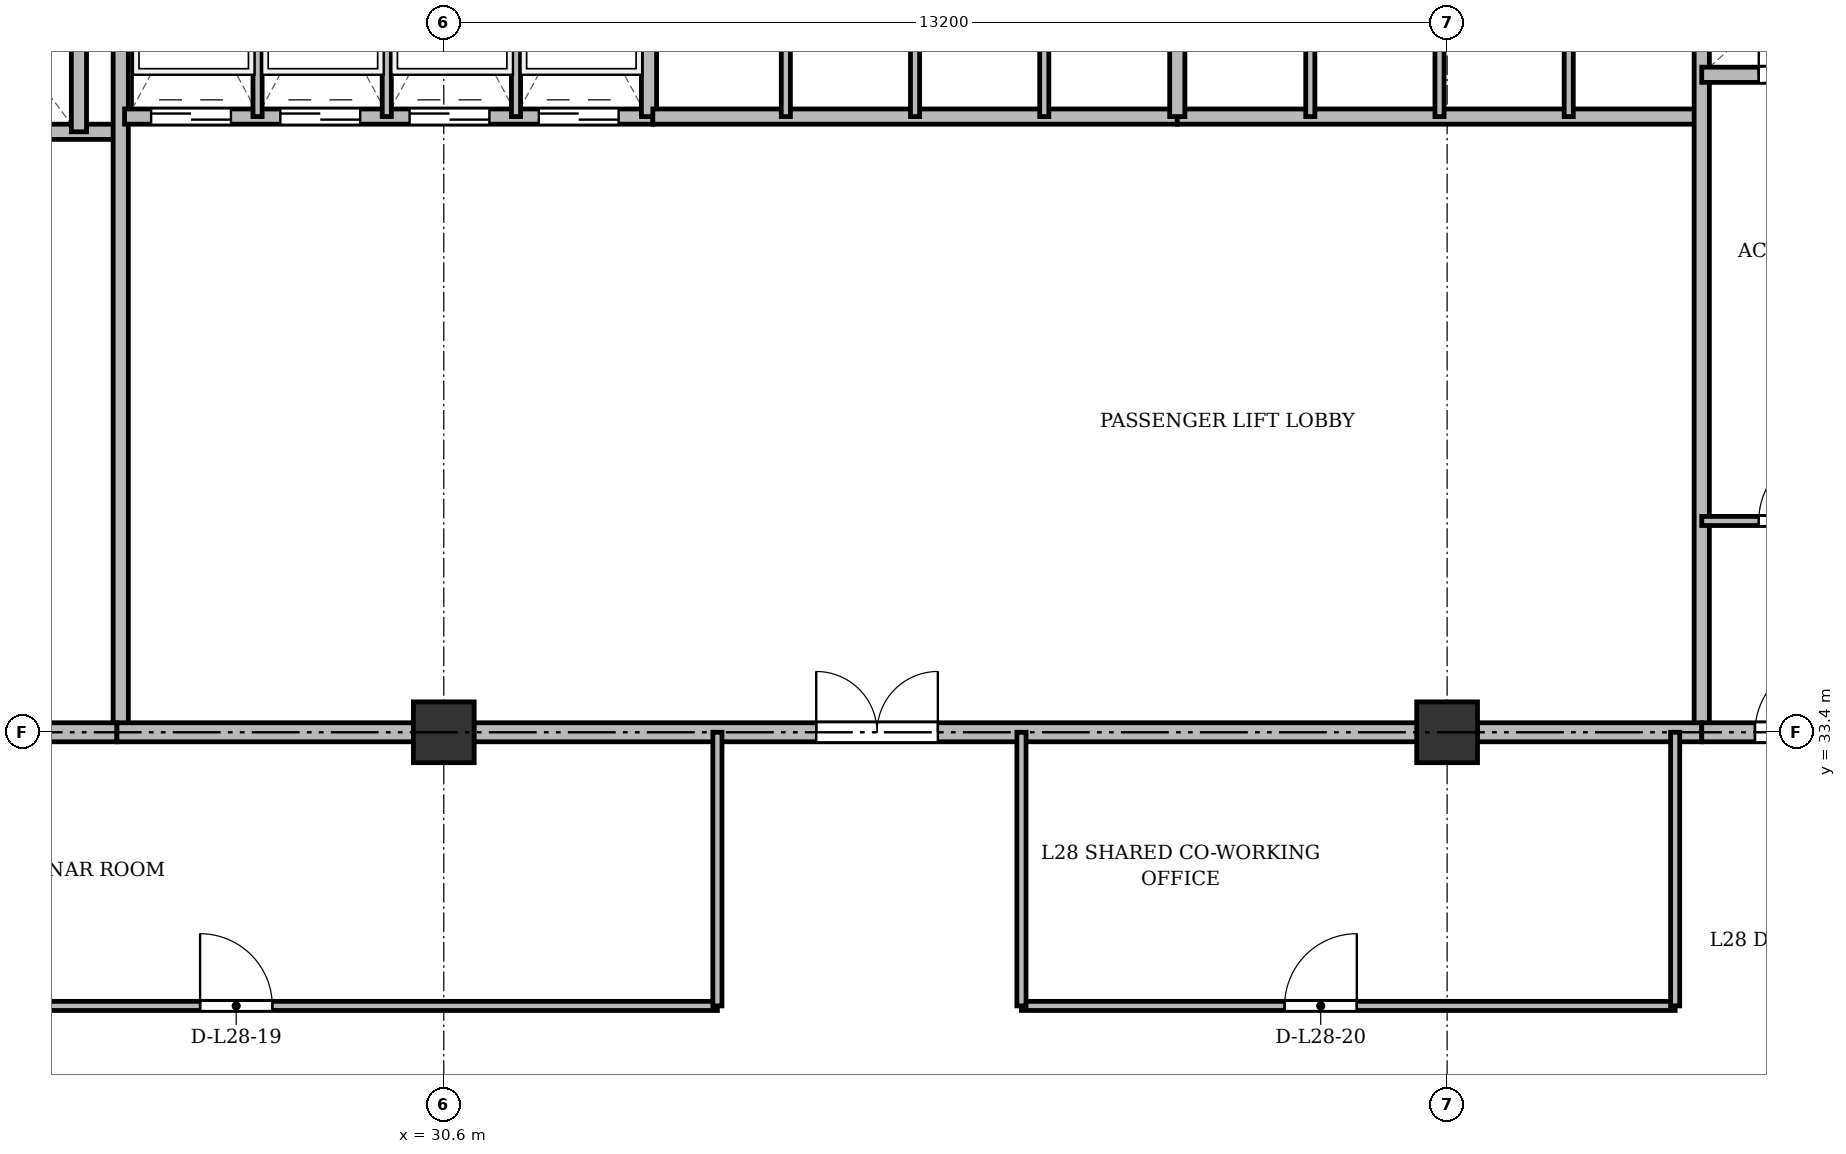
"""IFC4 building model, lengths in metres.
Left out: names, types, materials, properties, quantities, classifications, styles, units other than length and angle.
Written with IfcOpenShell. Run it as: python <this file> out.ifc"""

import sys

from ifc_helpers import new_model, si_unit, direction, frame, frame_2d, origin, origin_2d, place, context, subcontext, project, spatial, rectangle, extrude, source, transform, mapped, element, fill, save


model = new_model("IFC4")
c1 = context("Model", 3, precision=1e-05, world=origin(), true_north=direction((0.0, 1.0)))
c2 = subcontext(c1, "Body", "Model", "MODEL_VIEW")
j1 = project(units=[si_unit("LENGTHUNIT", "METRE"), si_unit("PLANEANGLEUNIT", "RADIAN")], contexts=[c1])
p1 = place(None, origin())
s1 = spatial("IfcSite", under=j1, at=p1, CompositionType="ELEMENT")
p2 = place(p1, origin())
s2 = spatial("IfcBuilding", under=s1, at=p2, CompositionType="ELEMENT")
p3 = place(p2, frame((0.0, 0.0, 110.5)))
s3 = spatial("IfcBuildingStorey", under=s2, at=p3, CompositionType="ELEMENT", Elevation=110.5)
m1 = source(origin(), c2, "Body", "SweptSolid", [
    extrude(rectangle(XDim=0.8, YDim=0.8, at=origin_2d()), origin(), (0.0, 0.0, 1.0), 3.6),
])
for number, where, z_axis, x_axis in (
    (1, (30.6, 33.4, 0.0), (0.0, 0.0, 1.0), (1.0, 0.0, 0.0)),
    (2, (43.8, 33.4, 0.0), (0.0, 0.0, 1.0), (1.0, 0.0, 0.0)),
):
    element("IfcColumn", number, at=place(p3, frame(where, z_axis=z_axis, x_axis=x_axis)), inside=s3, PredefinedType="COLUMN", context=c2, shape_type="MappedRepresentation", body=[
        mapped(m1, transform((0.0, 0.0, 0.0), x_axis=(1.0, 0.0, 0.0), y_axis=(0.0, 1.0, 0.0), z_axis=(0.0, 0.0, 1.0), scale=1.0)),
    ])
p4 = place(p3, frame((19.55, 41.3, 0.0), z_axis=(0.0, 0.0, 1.0), x_axis=(1.0, 0.0, 0.0)))
e3 = element("IfcWall", 3, at=p4, inside=s3, PredefinedType="SOLIDWALL", context=c2, shape_type="SweptSolid", body=[
    extrude(rectangle(XDim=6.75, YDim=0.2, at=frame_2d((3.375, 0.0))), origin(), (0.0, 0.0, 1.0), 3.34),
])
p5 = place(p4, frame((1.7, 0.0, 0.0)))
e4 = element("IfcOpeningElement", 4, at=p5, cuts=e3, PredefinedType="OPENING", context=c2, shape_type="SweptSolid", body=[
    extrude(rectangle(XDim=1.1, YDim=2.15, at=frame_2d((0.55, 1.075))), frame((0.0, 0.11, 0.0), z_axis=(0.0, -1.0, 0.0), x_axis=(1.0, 0.0, 0.0)), (0.0, 0.0, 1.0), 0.22),
])
p6 = place(p4, frame((4.4, 0.0, 0.0)))
e5 = element("IfcOpeningElement", 5, at=p6, cuts=e3, PredefinedType="OPENING", context=c2, shape_type="SweptSolid", body=[
    extrude(rectangle(XDim=1.1, YDim=2.15, at=frame_2d((0.55, 1.075))), frame((0.0, 0.11, 0.0), z_axis=(0.0, -1.0, 0.0), x_axis=(1.0, 0.0, 0.0)), (0.0, 0.0, 1.0), 0.22),
])
p7 = place(p3, frame((25.8, 41.3, 0.0), z_axis=(0.0, 0.0, 1.0), x_axis=(0.0, 1.0, 0.0)))
e6 = element("IfcWall", 6, at=p7, inside=s3, PredefinedType="SOLIDWALL", context=c2, shape_type="SweptSolid", body=[
    extrude(rectangle(XDim=3.4, YDim=0.2, at=frame_2d((1.7, 0.0))), origin(), (0.0, 0.0, 1.0), 3.34),
])
p8 = place(p3, frame((26.35, 33.4, 0.0), z_axis=(0.0, 0.0, 1.0), x_axis=(0.0, 1.0, 0.0)))
e7 = element("IfcWall", 7, at=p8, inside=s3, PredefinedType="SOLIDWALL", context=c2, shape_type="SweptSolid", body=[
    extrude(rectangle(XDim=11.3, YDim=0.2, at=frame_2d((5.65, 0.0))), origin(), (0.0, 0.0, 1.0), 2.752),
])
p9 = place(p3, frame((19.5, 33.4, 0.0), z_axis=(0.0, 0.0, 1.0), x_axis=(1.0, 0.0, 0.0)))
e8 = element("IfcWall", 8, at=p9, inside=s3, PredefinedType="PARTITIONING", context=c2, shape_type="SweptSolid", body=[
    extrude(rectangle(XDim=6.8, YDim=0.25, at=frame_2d((3.4, 0.0))), origin(), (0.0, 0.0, 1.0), 2.752),
])
p10 = place(p9, frame((0.75, 0.0, 0.0)))
e9 = element("IfcOpeningElement", 9, at=p10, cuts=e8, PredefinedType="OPENING", context=c2, shape_type="SweptSolid", body=[
    extrude(rectangle(XDim=1.6, YDim=2.2, at=frame_2d((0.8, 1.1))), frame((0.0, 0.135, 0.0), z_axis=(0.0, -1.0, 0.0), x_axis=(1.0, 0.0, 0.0)), (0.0, 0.0, 1.0), 0.27),
])
p11 = place(p3, frame((26.4, 41.5, 0.0), z_axis=(0.0, 0.0, 1.0), x_axis=(1.0, 0.0, 0.0)))
e10 = element("IfcWall", 10, at=p11, inside=s3, PredefinedType="SOLIDWALL", context=c2, shape_type="SweptSolid", body=[
    extrude(rectangle(XDim=6.95, YDim=0.2, at=frame_2d((3.475, 0.0))), origin(), (0.0, 0.0, 1.0), 3.34),
])
p12 = place(p11, frame((0.35, 0.0, 0.0)))
e11 = element("IfcOpeningElement", 11, at=p12, cuts=e10, PredefinedType="OPENING", context=c2, shape_type="SweptSolid", body=[
    extrude(rectangle(XDim=1.05, YDim=2.15, at=frame_2d((0.525, 1.075))), frame((0.0, 0.11, 0.0), z_axis=(0.0, -1.0, 0.0), x_axis=(1.0, 0.0, 0.0)), (0.0, 0.0, 1.0), 0.22),
])
p13 = place(p11, frame((2.05, 0.0, 0.0)))
e12 = element("IfcOpeningElement", 12, at=p13, cuts=e10, PredefinedType="OPENING", context=c2, shape_type="SweptSolid", body=[
    extrude(rectangle(XDim=1.05, YDim=2.15, at=frame_2d((0.525, 1.075))), frame((0.0, 0.11, 0.0), z_axis=(0.0, -1.0, 0.0), x_axis=(1.0, 0.0, 0.0)), (0.0, 0.0, 1.0), 0.22),
])
p14 = place(p11, frame((3.75, 0.0, 0.0)))
e13 = element("IfcOpeningElement", 13, at=p14, cuts=e10, PredefinedType="OPENING", context=c2, shape_type="SweptSolid", body=[
    extrude(rectangle(XDim=1.05, YDim=2.15, at=frame_2d((0.525, 1.075))), frame((0.0, 0.11, 0.0), z_axis=(0.0, -1.0, 0.0), x_axis=(1.0, 0.0, 0.0)), (0.0, 0.0, 1.0), 0.22),
])
p15 = place(p11, frame((5.45, 0.0, 0.0)))
e14 = element("IfcOpeningElement", 14, at=p15, cuts=e10, PredefinedType="OPENING", context=c2, shape_type="SweptSolid", body=[
    extrude(rectangle(XDim=1.05, YDim=2.15, at=frame_2d((0.525, 1.075))), frame((0.0, 0.11, 0.0), z_axis=(0.0, -1.0, 0.0), x_axis=(1.0, 0.0, 0.0)), (0.0, 0.0, 1.0), 0.22),
])
p16 = place(p3, frame((33.3, 41.5, 0.0), z_axis=(0.0, 0.0, 1.0), x_axis=(0.0, 1.0, 0.0)))
e15 = element("IfcWall", 15, at=p16, inside=s3, PredefinedType="SOLIDWALL", context=c2, shape_type="SweptSolid", body=[
    extrude(rectangle(XDim=3.2, YDim=0.2, at=frame_2d((1.6, 0.0))), origin(), (0.0, 0.0, 1.0), 3.34),
])
for number, where, z_axis, x_axis in (
    (16, (28.15, 41.5, 0.0), (0.0, 0.0, 1.0), (0.0, 1.0, 0.0)),
    (17, (29.85, 41.5, 0.0), (0.0, 0.0, 1.0), (0.0, 1.0, 0.0)),
    (18, (31.55, 41.5, 0.0), (0.0, 0.0, 1.0), (0.0, 1.0, 0.0)),
):
    element("IfcWall", number, at=place(p3, frame(where, z_axis=z_axis, x_axis=x_axis)), inside=s3, PredefinedType="PARTITIONING", context=c2, shape_type="SweptSolid", body=[
        extrude(rectangle(XDim=3.2, YDim=0.12, at=frame_2d((1.6, 0.0))), origin(), (0.0, 0.0, 1.0), 3.34),
    ])
p17 = place(p3, frame((33.35, 41.5, 0.0), z_axis=(0.0, 0.0, 1.0), x_axis=(1.0, 0.0, 0.0)))
e19 = element("IfcWall", 19, at=p17, inside=s3, PredefinedType="SOLIDWALL", context=c2, shape_type="SweptSolid", body=[
    extrude(rectangle(XDim=6.9, YDim=0.2, at=frame_2d((3.45, 0.0))), origin(), (0.0, 0.0, 1.0), 3.34),
])
for number, where, z_axis, x_axis in (
    (20, (35.1, 41.5, 0.0), (0.0, 0.0, 1.0), (0.0, 1.0, 0.0)),
    (21, (36.8, 41.5, 0.0), (0.0, 0.0, 1.0), (0.0, 1.0, 0.0)),
    (22, (38.5, 41.5, 0.0), (0.0, 0.0, 1.0), (0.0, 1.0, 0.0)),
):
    element("IfcWall", number, at=place(p3, frame(where, z_axis=z_axis, x_axis=x_axis)), inside=s3, PredefinedType="PARTITIONING", context=c2, shape_type="SweptSolid", body=[
        extrude(rectangle(XDim=3.2, YDim=0.12, at=frame_2d((1.6, 0.0))), origin(), (0.0, 0.0, 1.0), 3.34),
    ])
p18 = place(p3, frame((40.25, 41.5, 0.0), z_axis=(0.0, 0.0, 1.0), x_axis=(1.0, 0.0, 0.0)))
e23 = element("IfcWall", 23, at=p18, inside=s3, PredefinedType="SOLIDWALL", context=c2, shape_type="SweptSolid", body=[
    extrude(rectangle(XDim=6.9, YDim=0.2, at=frame_2d((3.45, 0.0))), origin(), (0.0, 0.0, 1.0), 2.84),
])
p19 = place(p3, frame((40.25, 41.5, 0.0), z_axis=(0.0, 0.0, 1.0), x_axis=(0.0, 1.0, 0.0)))
e24 = element("IfcWall", 24, at=p19, inside=s3, PredefinedType="SOLIDWALL", context=c2, shape_type="SweptSolid", body=[
    extrude(rectangle(XDim=3.2, YDim=0.2, at=frame_2d((1.6, 0.0))), origin(), (0.0, 0.0, 1.0), 3.34),
])
p20 = place(p3, frame((42.0, 41.5, 0.0), z_axis=(0.0, 0.0, 1.0), x_axis=(0.0, 1.0, 0.0)))
e25 = element("IfcWall", 25, at=p20, inside=s3, PredefinedType="PARTITIONING", context=c2, shape_type="SweptSolid", body=[
    extrude(rectangle(XDim=3.2, YDim=0.12, at=frame_2d((1.6, 0.0))), origin(), (0.0, 0.0, 1.0), 3.34),
])
p21 = place(p3, frame((43.7, 41.5, 0.0), z_axis=(0.0, 0.0, 1.0), x_axis=(0.0, 1.0, 0.0)))
e26 = element("IfcWall", 26, at=p21, inside=s3, PredefinedType="PARTITIONING", context=c2, shape_type="SweptSolid", body=[
    extrude(rectangle(XDim=3.2, YDim=0.12, at=frame_2d((1.6, 0.0))), origin(), (0.0, 0.0, 1.0), 2.84),
])
p22 = place(p3, frame((45.4, 41.5, 0.0), z_axis=(0.0, 0.0, 1.0), x_axis=(0.0, 1.0, 0.0)))
e27 = element("IfcWall", 27, at=p22, inside=s3, PredefinedType="PARTITIONING", context=c2, shape_type="SweptSolid", body=[
    extrude(rectangle(XDim=3.2, YDim=0.12, at=frame_2d((1.6, 0.0))), origin(), (0.0, 0.0, 1.0), 3.34),
])
p23 = place(p3, frame((47.15, 33.4, 0.0), z_axis=(0.0, 0.0, 1.0), x_axis=(0.0, 1.0, 0.0)))
e28 = element("IfcWall", 28, at=p23, inside=s3, PredefinedType="SOLIDWALL", context=c2, shape_type="SweptSolid", body=[
    extrude(rectangle(XDim=11.3, YDim=0.2, at=frame_2d((5.65, 0.0))), origin(), (0.0, 0.0, 1.0), 2.752),
])
p24 = place(p3, frame((26.3, 33.4, 0.0), z_axis=(0.0, 0.0, 1.0), x_axis=(1.0, 0.0, 0.0)))
e29 = element("IfcWall", 29, at=p24, inside=s3, PredefinedType="PARTITIONING", context=c2, shape_type="SweptSolid", body=[
    extrude(rectangle(XDim=20.85, YDim=0.25, at=frame_2d((10.425, 0.0))), origin(), (0.0, 0.0, 1.0), 2.752),
])
p25 = place(p24, frame((9.2, 0.0, 0.0)))
e30 = element("IfcOpeningElement", 30, at=p25, cuts=e29, PredefinedType="OPENING", context=c2, shape_type="SweptSolid", body=[
    extrude(rectangle(XDim=1.6, YDim=2.2, at=frame_2d((0.8, 1.1))), frame((0.0, 0.135, 0.0), z_axis=(0.0, -1.0, 0.0), x_axis=(1.0, 0.0, 0.0)), (0.0, 0.0, 1.0), 0.27),
])
p26 = place(p3, frame((47.15, 42.05, 0.0), z_axis=(0.0, 0.0, 1.0), x_axis=(1.0, 0.0, 0.0)))
e31 = element("IfcWall", 31, at=p26, inside=s3, PredefinedType="SOLIDWALL", context=c2, shape_type="SweptSolid", body=[
    extrude(rectangle(XDim=7.85, YDim=0.2, at=frame_2d((3.925, 0.0))), origin(), (0.0, 0.0, 1.0), 2.84),
])
p27 = place(p26, frame((0.75, 0.0, 0.0)))
e32 = element("IfcOpeningElement", 32, at=p27, cuts=e31, PredefinedType="OPENING", context=c2, shape_type="SweptSolid", body=[
    extrude(rectangle(XDim=0.9, YDim=2.1, at=frame_2d((0.45, 1.05))), frame((0.0, 0.11, 0.0), z_axis=(0.0, -1.0, 0.0), x_axis=(1.0, 0.0, 0.0)), (0.0, 0.0, 1.0), 0.22),
])
p28 = place(p26, frame((3.85, 0.0, 0.0)))
e33 = element("IfcOpeningElement", 33, at=p28, cuts=e31, PredefinedType="OPENING", context=c2, shape_type="SweptSolid", body=[
    extrude(rectangle(XDim=0.9, YDim=2.1, at=frame_2d((0.45, 1.05))), frame((0.0, 0.11, 0.0), z_axis=(0.0, -1.0, 0.0), x_axis=(1.0, 0.0, 0.0)), (0.0, 0.0, 1.0), 0.22),
])
p29 = place(p3, frame((47.15, 36.18, 0.0), z_axis=(0.0, 0.0, 1.0), x_axis=(1.0, 0.0, 0.0)))
e34 = element("IfcWall", 34, at=p29, inside=s3, PredefinedType="PARTITIONING", context=c2, shape_type="SweptSolid", body=[
    extrude(rectangle(XDim=5.3, YDim=0.12, at=frame_2d((2.65, 0.0))), origin(), (0.0, 0.0, 1.0), 2.84),
])
p30 = place(p29, frame((0.75, 0.0, 0.0)))
e35 = element("IfcOpeningElement", 35, at=p30, cuts=e34, PredefinedType="OPENING", context=c2, shape_type="SweptSolid", body=[
    extrude(rectangle(XDim=0.95, YDim=2.15, at=frame_2d((0.475, 1.075))), frame((0.0, 0.07, 0.0), z_axis=(0.0, -1.0, 0.0), x_axis=(1.0, 0.0, 0.0)), (0.0, 0.0, 1.0), 0.14),
])
p31 = place(p29, frame((3.45, 0.0, 0.0)))
e36 = element("IfcOpeningElement", 36, at=p31, cuts=e34, PredefinedType="OPENING", context=c2, shape_type="SweptSolid", body=[
    extrude(rectangle(XDim=0.95, YDim=2.15, at=frame_2d((0.475, 1.075))), frame((0.0, 0.07, 0.0), z_axis=(0.0, -1.0, 0.0), x_axis=(1.0, 0.0, 0.0)), (0.0, 0.0, 1.0), 0.14),
])
p32 = place(p3, frame((47.15, 33.4, 0.0), z_axis=(0.0, 0.0, 1.0), x_axis=(1.0, 0.0, 0.0)))
e37 = element("IfcWall", 37, at=p32, inside=s3, PredefinedType="PARTITIONING", context=c2, shape_type="SweptSolid", body=[
    extrude(rectangle(XDim=11.15, YDim=0.25, at=frame_2d((5.575, 0.0))), origin(), (0.0, 0.0, 1.0), 2.752),
])
p33 = place(p32, frame((0.7, 0.0, 0.0)))
e38 = element("IfcOpeningElement", 38, at=p33, cuts=e37, PredefinedType="OPENING", context=c2, shape_type="SweptSolid", body=[
    extrude(rectangle(XDim=0.95, YDim=2.15, at=frame_2d((0.475, 1.075))), frame((0.0, 0.135, 0.0), z_axis=(0.0, -1.0, 0.0), x_axis=(1.0, 0.0, 0.0)), (0.0, 0.0, 1.0), 0.27),
])
p34 = place(p32, frame((6.0, 0.0, 0.0)))
e39 = element("IfcOpeningElement", 39, at=p34, cuts=e37, PredefinedType="OPENING", context=c2, shape_type="SweptSolid", body=[
    extrude(rectangle(XDim=1.2, YDim=2.15, at=frame_2d((0.6, 1.075))), frame((0.0, 0.135, 0.0), z_axis=(0.0, -1.0, 0.0), x_axis=(1.0, 0.0, 0.0)), (0.0, 0.0, 1.0), 0.27),
])
p35 = place(p3, frame((22.45, 29.8, 0.0), z_axis=(0.0, 0.0, 1.0), x_axis=(1.0, 0.0, 0.0)))
e40 = element("IfcWall", 40, at=p35, inside=s3, PredefinedType="PARTITIONING", context=c2, shape_type="SweptSolid", body=[
    extrude(rectangle(XDim=11.75, YDim=0.12, at=frame_2d((5.875, 0.0))), origin(), (0.0, 0.0, 1.0), 2.84),
])
p36 = place(p35, frame((4.944, 0.0, 0.0)))
e41 = element("IfcOpeningElement", 41, at=p36, cuts=e40, PredefinedType="OPENING", context=c2, shape_type="SweptSolid", body=[
    extrude(rectangle(XDim=0.95, YDim=2.15, at=frame_2d((0.475, 1.075))), frame((0.0, 0.07, 0.0), z_axis=(0.0, -1.0, 0.0), x_axis=(1.0, 0.0, 0.0)), (0.0, 0.0, 1.0), 0.14),
])
p37 = place(p3, frame((38.2, 29.8, 0.0), z_axis=(0.0, 0.0, 1.0), x_axis=(1.0, 0.0, 0.0)))
e42 = element("IfcWall", 42, at=p37, inside=s3, PredefinedType="PARTITIONING", context=c2, shape_type="SweptSolid", body=[
    extrude(rectangle(XDim=8.6, YDim=0.12, at=frame_2d((4.3, 0.0))), origin(), (0.0, 0.0, 1.0), 2.84),
])
p38 = place(p37, frame((3.462, 0.0, 0.0)))
e43 = element("IfcOpeningElement", 43, at=p38, cuts=e42, PredefinedType="OPENING", context=c2, shape_type="SweptSolid", body=[
    extrude(rectangle(XDim=0.95, YDim=2.15, at=frame_2d((0.475, 1.075))), frame((0.0, 0.07, 0.0), z_axis=(0.0, -1.0, 0.0), x_axis=(1.0, 0.0, 0.0)), (0.0, 0.0, 1.0), 0.14),
])
for number, where, z_axis, x_axis in (
    (44, (34.2, 29.8, 0.0), (0.0, 0.0, 1.0), (0.0, 1.0, 0.0)),
    (45, (38.2, 29.8, 0.0), (0.0, 0.0, 1.0), (0.0, 1.0, 0.0)),
    (46, (46.8, 29.8, 0.0), (0.0, 0.0, 1.0), (0.0, 1.0, 0.0)),
):
    element("IfcWall", number, at=place(p3, frame(where, z_axis=z_axis, x_axis=x_axis)), inside=s3, PredefinedType="PARTITIONING", context=c2, shape_type="SweptSolid", body=[
        extrude(rectangle(XDim=3.6, YDim=0.12, at=frame_2d((1.8, 0.0))), origin(), (0.0, 0.0, 1.0), 2.752),
    ])
m2 = source(origin(), c2, "Body", "SweptSolid", [
    extrude(rectangle(XDim=1.05, YDim=2.15, at=frame_2d((0.525, 1.075))), frame((0.0, 0.025, 0.0), z_axis=(0.0, -1.0, 0.0), x_axis=(1.0, 0.0, 0.0)), (0.0, 0.0, 1.0), 0.05),
])
p39 = place(p12, origin())
e47 = element("IfcDoor", 47, at=p39, inside=s3, OperationType="DOUBLE_DOOR_SLIDING", PredefinedType="DOOR", context=c2, shape_type="MappedRepresentation", body=[
    mapped(m2, transform((0.0, 0.0, 0.0), x_axis=(1.0, 0.0, 0.0), y_axis=(0.0, 1.0, 0.0), z_axis=(0.0, 0.0, 1.0), scale=1.0)),
])
fill(e11, e47)
p40 = place(p13, origin())
e48 = element("IfcDoor", 48, at=p40, inside=s3, OperationType="DOUBLE_DOOR_SLIDING", PredefinedType="DOOR", context=c2, shape_type="MappedRepresentation", body=[
    mapped(m2, transform((0.0, 0.0, 0.0), x_axis=(1.0, 0.0, 0.0), y_axis=(0.0, 1.0, 0.0), z_axis=(0.0, 0.0, 1.0), scale=1.0)),
])
fill(e12, e48)
p41 = place(p14, origin())
e49 = element("IfcDoor", 49, at=p41, inside=s3, OperationType="DOUBLE_DOOR_SLIDING", PredefinedType="DOOR", context=c2, shape_type="MappedRepresentation", body=[
    mapped(m2, transform((0.0, 0.0, 0.0), x_axis=(1.0, 0.0, 0.0), y_axis=(0.0, 1.0, 0.0), z_axis=(0.0, 0.0, 1.0), scale=1.0)),
])
fill(e13, e49)
p42 = place(p15, origin())
e50 = element("IfcDoor", 50, at=p42, inside=s3, OperationType="DOUBLE_DOOR_SLIDING", PredefinedType="DOOR", context=c2, shape_type="MappedRepresentation", body=[
    mapped(m2, transform((0.0, 0.0, 0.0), x_axis=(1.0, 0.0, 0.0), y_axis=(0.0, 1.0, 0.0), z_axis=(0.0, 0.0, 1.0), scale=1.0)),
])
fill(e14, e50)
m3 = source(origin(), c2, "Body", "SweptSolid", [
    extrude(rectangle(XDim=1.6, YDim=2.2, at=frame_2d((0.8, 1.1))), frame((0.0, 0.025, 0.0), z_axis=(0.0, -1.0, 0.0), x_axis=(1.0, 0.0, 0.0)), (0.0, 0.0, 1.0), 0.05),
])
p43 = place(p25, origin())
e51 = element("IfcDoor", 51, at=p43, inside=s3, OperationType="DOUBLE_DOOR_SINGLE_SWING", PredefinedType="DOOR", context=c2, shape_type="MappedRepresentation", body=[
    mapped(m3, transform((0.0, 0.0, 0.0), x_axis=(1.0, 0.0, 0.0), y_axis=(0.0, 1.0, 0.0), z_axis=(0.0, 0.0, 1.0), scale=1.0)),
])
fill(e30, e51)
m4 = source(origin(), c2, "Body", "SweptSolid", [
    extrude(rectangle(XDim=0.9, YDim=2.1, at=frame_2d((0.45, 1.05))), frame((0.0, 0.025, 0.0), z_axis=(0.0, -1.0, 0.0), x_axis=(1.0, 0.0, 0.0)), (0.0, 0.0, 1.0), 0.05),
])
p44 = place(p27, origin())
e52 = element("IfcDoor", 52, at=p44, inside=s3, OperationType="SINGLE_SWING_LEFT", PredefinedType="DOOR", context=c2, shape_type="MappedRepresentation", body=[
    mapped(m4, transform((0.0, 0.0, 0.0), x_axis=(1.0, 0.0, 0.0), y_axis=(0.0, 1.0, 0.0), z_axis=(0.0, 0.0, 1.0), scale=1.0)),
])
fill(e32, e52)
m5 = source(origin(), c2, "Body", "SweptSolid", [
    extrude(rectangle(XDim=0.95, YDim=2.15, at=frame_2d((0.475, 1.075))), frame((0.0, 0.025, 0.0), z_axis=(0.0, -1.0, 0.0), x_axis=(1.0, 0.0, 0.0)), (0.0, 0.0, 1.0), 0.05),
])
p45 = place(p30, origin())
e53 = element("IfcDoor", 53, at=p45, inside=s3, OperationType="SINGLE_SWING_RIGHT", PredefinedType="DOOR", context=c2, shape_type="MappedRepresentation", body=[
    mapped(m5, transform((0.0, 0.0, 0.0), x_axis=(1.0, 0.0, 0.0), y_axis=(0.0, 1.0, 0.0), z_axis=(0.0, 0.0, 1.0), scale=1.0)),
])
fill(e35, e53)
p46 = place(p33, origin())
e54 = element("IfcDoor", 54, at=p46, inside=s3, OperationType="SINGLE_SWING_RIGHT", PredefinedType="DOOR", context=c2, shape_type="MappedRepresentation", body=[
    mapped(m5, transform((0.0, 0.0, 0.0), x_axis=(1.0, 0.0, 0.0), y_axis=(0.0, 1.0, 0.0), z_axis=(0.0, 0.0, 1.0), scale=1.0)),
])
fill(e38, e54)
p47 = place(p36, origin())
e55 = element("IfcDoor", 55, at=p47, inside=s3, OperationType="SINGLE_SWING_LEFT", PredefinedType="DOOR", context=c2, shape_type="MappedRepresentation", body=[
    mapped(m5, transform((0.0, 0.0, 0.0), x_axis=(1.0, 0.0, 0.0), y_axis=(0.0, 1.0, 0.0), z_axis=(0.0, 0.0, 1.0), scale=1.0)),
])
fill(e41, e55)
p48 = place(p38, origin())
e56 = element("IfcDoor", 56, at=p48, inside=s3, OperationType="SINGLE_SWING_RIGHT", PredefinedType="DOOR", context=c2, shape_type="MappedRepresentation", body=[
    mapped(m5, transform((0.0, 0.0, 0.0), x_axis=(1.0, 0.0, 0.0), y_axis=(0.0, 1.0, 0.0), z_axis=(0.0, 0.0, 1.0), scale=1.0)),
])
fill(e43, e56)
save(model, sys.argv[1])
